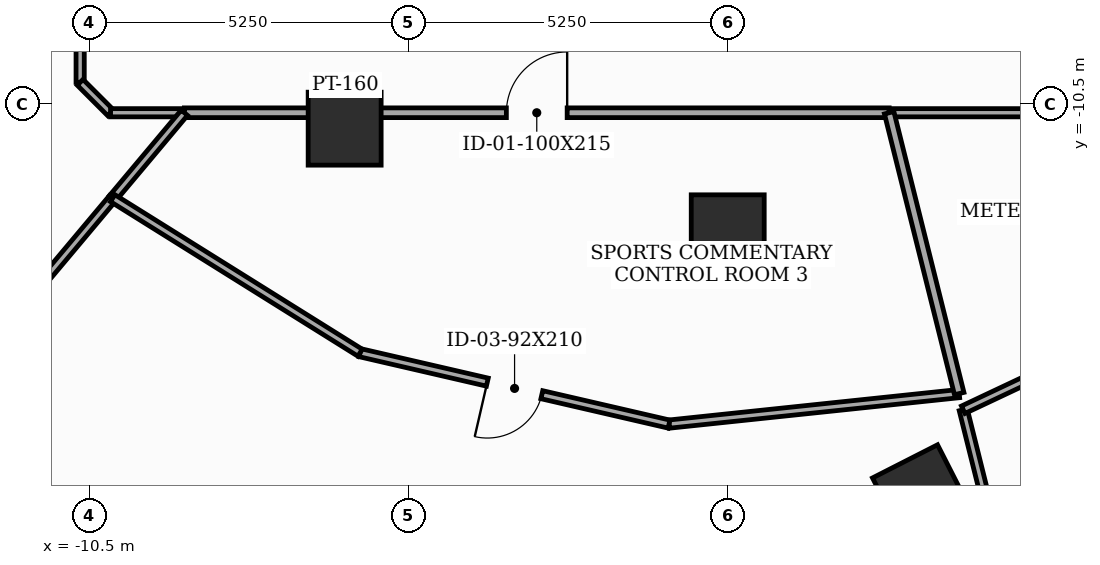
"""IFC4 building model, lengths in metres.
Left out: names, types, materials, properties, quantities, classifications, styles, units other than length and angle.
Written with IfcOpenShell. Run it as: python <this file> out.ifc"""

import sys

from ifc_helpers import new_model, si_unit, direction, frame, frame_2d, origin, origin_2d, place, context, subcontext, project, spatial, rectangle, extrude, element, fill, save


model = new_model("IFC4")
c1 = context("Model", 3, precision=1e-05, world=origin(), true_north=direction((0.0, 1.0)))
c2 = subcontext(c1, "Body", "Model", "MODEL_VIEW")
j1 = project(units=[si_unit("LENGTHUNIT", "METRE"), si_unit("PLANEANGLEUNIT", "RADIAN")], contexts=[c1])
p1 = place(None, origin())
s1 = spatial("IfcSite", under=j1, at=p1, CompositionType="ELEMENT")
p2 = place(p1, origin())
s2 = spatial("IfcBuilding", under=s1, at=p2, CompositionType="ELEMENT")
p3 = place(p2, frame((0.0, 0.0, 119.9)))
s3 = spatial("IfcBuildingStorey", under=s2, at=p3, CompositionType="ELEMENT", Elevation=119.9)
for number, where, z_axis, x_axis in (
    (1, (-6.3, -10.912, 0.0), (0.0, 0.0, 1.0), (1.0, 0.0, 0.0)),
    (2, (0.0, -12.6, 0.0), (0.0, 0.0, 1.0), (1.0, 0.0, 0.0)),
    (3, (3.188, -16.918, 0.0), (0.0, 0.0, 1.0), (0.891, 0.454, 0.0)),
):
    element("IfcColumn", number, at=place(p3, frame(where, z_axis=z_axis, x_axis=x_axis)), inside=s3, PredefinedType="COLUMN", context=c2, shape_type="SweptSolid", body=[
        extrude(rectangle(XDim=1.2, YDim=1.2, at=origin_2d()), origin(), (0.0, 0.0, 1.0), 3.7),
    ])
p4 = place(p3, frame((-10.65, -2.264, 0.0), z_axis=(0.0, 0.0, 1.0), x_axis=(0.0, -1.0, 0.0)))
e4 = element("IfcWall", 4, at=p4, inside=s3, PredefinedType="PARTITIONING", context=c2, shape_type="SweptSolid", body=[
    extrude(rectangle(XDim=7.886, YDim=0.135, at=frame_2d((3.943, 0.0))), origin(), (0.0, 0.0, 1.0), 2.785),
])
p5 = place(p3, frame((-10.65, -10.15, 0.0), z_axis=(0.0, 0.0, 1.0), x_axis=(0.707106781187, -0.707106781187, 0.0)))
e5 = element("IfcWall", 5, at=p5, inside=s3, PredefinedType="PARTITIONING", context=c2, shape_type="SweptSolid", body=[
    extrude(rectangle(XDim=0.707, YDim=0.135, at=frame_2d((0.354, 0.0))), origin(), (0.0, 0.0, 1.0), 3.5),
])
p6 = place(p3, frame((-10.15, -10.65, 0.0), z_axis=(0.0, 0.0, 1.0), x_axis=(1.0, 0.0, 0.0)))
e6 = element("IfcWall", 6, at=p6, inside=s3, PredefinedType="PARTITIONING", context=c2, shape_type="SweptSolid", body=[
    extrude(rectangle(XDim=1.214, YDim=0.135, at=frame_2d((0.607, 0.0))), origin(), (0.0, 0.0, 1.0), 3.5),
])
p7 = place(p3, frame((-8.936, -10.65, 0.0), z_axis=(0.0, 0.0, 1.0), x_axis=(1.0, 0.0, 0.0)))
e7 = element("IfcWall", 7, at=p7, inside=s3, PredefinedType="PARTITIONING", context=c2, shape_type="SweptSolid", body=[
    extrude(rectangle(XDim=11.591, YDim=0.16, at=frame_2d((5.795, 0.0))), origin(), (0.0, 0.0, 1.0), 2.785),
])
p8 = place(p7, frame((5.295, 0.0, 0.0)))
e8 = element("IfcOpeningElement", 8, at=p8, cuts=e7, PredefinedType="OPENING", context=c2, shape_type="SweptSolid", body=[
    extrude(rectangle(XDim=1.0, YDim=2.15, at=frame_2d((0.5, 1.075))), frame((0.0, 0.09, 0.0), z_axis=(0.0, -1.0, 0.0), x_axis=(1.0, 0.0, 0.0)), (0.0, 0.0, 1.0), 0.18),
])
p9 = place(p3, frame((2.655, -10.65, 0.0), z_axis=(0.0, 0.0, 1.0), x_axis=(1.0, 0.0, 0.0)))
e9 = element("IfcWall", 9, at=p9, inside=s3, PredefinedType="PARTITIONING", context=c2, shape_type="SweptSolid", body=[
    extrude(rectangle(XDim=7.495, YDim=0.135, at=frame_2d((3.748, 0.0))), origin(), (0.0, 0.0, 1.0), 2.785),
])
p10 = place(p3, frame((-18.896, -22.52, 0.0), z_axis=(0.0, 0.0, 1.0), x_axis=(0.642815636807, 0.766020924698, 0.0)))
e10 = element("IfcWall", 10, at=p10, inside=s3, PredefinedType="PARTITIONING", context=c2, shape_type="SweptSolid", body=[
    extrude(rectangle(XDim=13.661, YDim=0.135, at=frame_2d((6.831, 0.0))), origin(), (0.0, 0.0, 1.0), 2.985),
])
p11 = place(p3, frame((-10.115, -12.055, 0.0), z_axis=(0.0, 0.0, 1.0), x_axis=(0.64278617419, 0.766045647642, 0.0)))
e11 = element("IfcWall", 11, at=p11, inside=s3, PredefinedType="PARTITIONING", context=c2, shape_type="SweptSolid", body=[
    extrude(rectangle(XDim=1.834, YDim=0.135, at=frame_2d((0.917, 0.0))), origin(), (0.0, 0.0, 1.0), 3.5),
])
p12 = place(p3, frame((3.807, -15.269, 0.0), z_axis=(0.0, 0.0, 1.0), x_axis=(-0.994513256503, -0.104610623932, 0.0)))
e12 = element("IfcWall", 12, at=p12, inside=s3, PredefinedType="PARTITIONING", context=c2, shape_type="SweptSolid", body=[
    extrude(rectangle(XDim=4.798, YDim=0.135, at=frame_2d((2.399, 0.0))), origin(), (0.0, 0.0, 1.0), 2.885),
])
p13 = place(p3, frame((-0.965, -15.771, 0.0), z_axis=(0.0, 0.0, 1.0), x_axis=(-0.974324872008, 0.225146716135, 0.0)))
e13 = element("IfcWall", 13, at=p13, inside=s3, PredefinedType="PARTITIONING", context=c2, shape_type="SweptSolid", body=[
    extrude(rectangle(XDim=5.215, YDim=0.135, at=frame_2d((2.607, 0.0))), origin(), (0.0, 0.0, 1.0), 2.885),
])
p14 = place(p13, frame((2.147, 0.0, 0.0)))
e14 = element("IfcOpeningElement", 14, at=p14, cuts=e13, PredefinedType="OPENING", context=c2, shape_type="SweptSolid", body=[
    extrude(rectangle(XDim=0.92, YDim=2.1, at=frame_2d((0.46, 1.05))), frame((0.0, 0.077, 0.0), z_axis=(0.0, -1.0, 0.0), x_axis=(1.0, 0.0, 0.0)), (0.0, 0.0, 1.0), 0.155),
])
p15 = place(p3, frame((-6.046, -14.597, 0.0), z_axis=(0.0, 0.0, 1.0), x_axis=(-0.848109776096, 0.529820542912, 0.0)))
e15 = element("IfcWall", 15, at=p15, inside=s3, PredefinedType="PARTITIONING", context=c2, shape_type="SweptSolid", body=[
    extrude(rectangle(XDim=4.798, YDim=0.135, at=frame_2d((2.399, 0.0))), origin(), (0.0, 0.0, 1.0), 3.5),
])
p16 = place(p3, frame((4.393, -17.618, 0.0), z_axis=(0.0, 0.0, 1.0), x_axis=(-0.242107483306, 0.970249435211, 0.0)))
e16 = element("IfcWall", 16, at=p16, inside=s3, PredefinedType="PARTITIONING", context=c2, shape_type="SweptSolid", body=[
    extrude(rectangle(XDim=2.147, YDim=0.135, at=frame_2d((1.073, 0.0))), origin(), (0.0, 0.0, 1.0), 2.985),
])
p17 = place(p3, frame((3.807, -15.269, 0.0), z_axis=(0.0, 0.0, 1.0), x_axis=(-0.241956377954, 0.970287128209, 0.0)))
e17 = element("IfcWall", 17, at=p17, inside=s3, PredefinedType="PARTITIONING", context=c2, shape_type="SweptSolid", body=[
    extrude(rectangle(XDim=4.76, YDim=0.16, at=frame_2d((2.38, 0.0))), origin(), (0.0, 0.0, 1.0), 2.785),
])
p18 = place(p3, frame((3.873, -15.535, 0.0), z_axis=(0.0, 0.0, 1.0), x_axis=(0.904472849066, 0.426531200855, 0.0)))
e18 = element("IfcWall", 18, at=p18, inside=s3, PredefinedType="PARTITIONING", context=c2, shape_type="SweptSolid", body=[
    extrude(rectangle(XDim=6.677, YDim=0.135, at=frame_2d((3.338, 0.0))), origin(), (0.0, 0.0, 1.0), 3.5),
])
p19 = place(p18, frame((2.878, 0.0, 0.0)))
e19 = element("IfcOpeningElement", 19, at=p19, cuts=e18, PredefinedType="OPENING", context=c2, shape_type="SweptSolid", body=[
    extrude(rectangle(XDim=0.92, YDim=2.1, at=frame_2d((0.46, 1.05))), frame((0.0, 0.077, 0.0), z_axis=(0.0, -1.0, 0.0), x_axis=(1.0, 0.0, 0.0)), (0.0, 0.0, 1.0), 0.155),
])
p20 = place(p8, origin())
e20 = element("IfcDoor", 20, at=p20, inside=s3, OperationType="SINGLE_SWING_RIGHT", PredefinedType="DOOR", context=c2, shape_type="SweptSolid", body=[
    extrude(rectangle(XDim=1.0, YDim=2.15, at=frame_2d((0.5, 1.075))), frame((0.0, 0.025, 0.0), z_axis=(0.0, -1.0, 0.0), x_axis=(1.0, 0.0, 0.0)), (0.0, 0.0, 1.0), 0.05),
])
fill(e8, e20)
p21 = place(p14, origin())
e21 = element("IfcDoor", 21, at=p21, inside=s3, OperationType="SINGLE_SWING_RIGHT", PredefinedType="DOOR", context=c2, shape_type="SweptSolid", body=[
    extrude(rectangle(XDim=0.92, YDim=2.1, at=frame_2d((0.46, 1.05))), frame((0.0, 0.025, 0.0), z_axis=(0.0, -1.0, 0.0), x_axis=(1.0, 0.0, 0.0)), (0.0, 0.0, 1.0), 0.05),
])
fill(e14, e21)
save(model, sys.argv[1])
